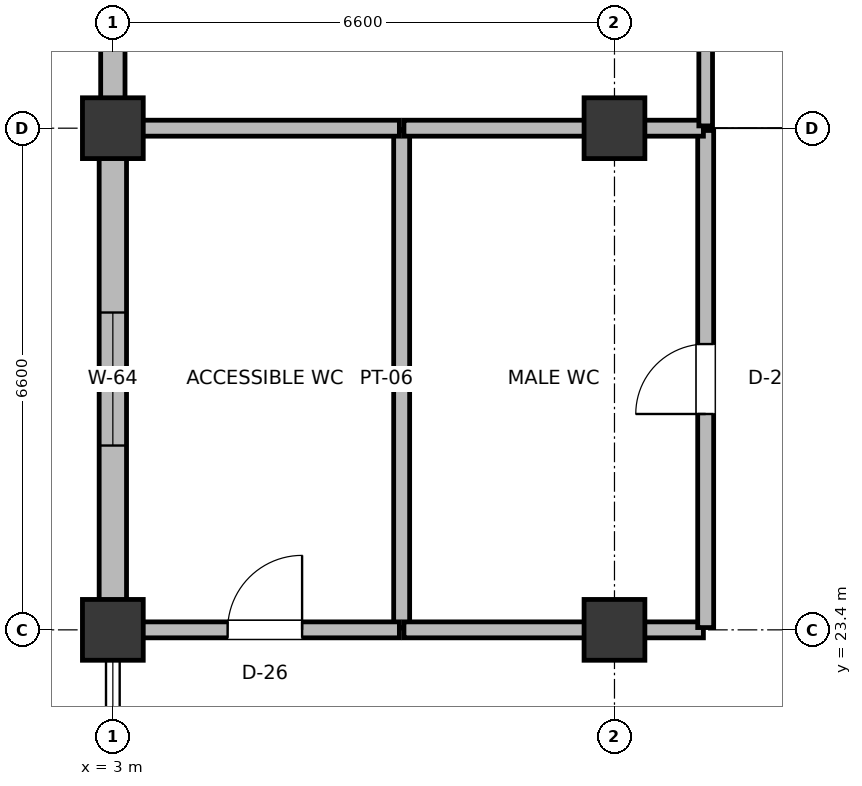
"""IFC4 building model, lengths in metres.
Left out: names, types, materials, properties, quantities, classifications, styles, units other than length and angle.
Written with IfcOpenShell. Run it as: python <this file> out.ifc"""

import sys

from ifc_helpers import new_model, si_unit, direction, frame, frame_2d, origin, origin_2d, place, context, subcontext, project, spatial, rectangle, extrude, element, fill, save


model = new_model("IFC4")
c1 = context("Model", 3, precision=1e-05, world=origin(), true_north=direction((0.0, 1.0)))
c2 = subcontext(c1, "Body", "Model", "MODEL_VIEW")
j1 = project(units=[si_unit("LENGTHUNIT", "METRE"), si_unit("PLANEANGLEUNIT", "RADIAN")], contexts=[c1])
p1 = place(None, origin())
s1 = spatial("IfcSite", under=j1, at=p1, CompositionType="ELEMENT")
p2 = place(p1, origin())
s2 = spatial("IfcBuilding", under=s1, at=p2, CompositionType="ELEMENT")
p3 = place(p2, frame((0.0, 0.0, 19.5)))
s3 = spatial("IfcBuildingStorey", under=s2, at=p3, CompositionType="ELEMENT", Elevation=19.5)
for number, where, z_axis, x_axis in (
    (1, (3.0, 23.4, 0.0), (0.0, 0.0, 1.0), (1.0, 0.0, 0.0)),
    (2, (3.0, 30.0, 0.0), (0.0, 0.0, 1.0), (1.0, 0.0, 0.0)),
    (3, (9.6, 23.4, 0.0), (0.0, 0.0, 1.0), (1.0, 0.0, 0.0)),
    (4, (9.6, 30.0, 0.0), (0.0, 0.0, 1.0), (1.0, 0.0, 0.0)),
):
    element("IfcColumn", number, at=place(p3, frame(where, z_axis=z_axis, x_axis=x_axis)), inside=s3, PredefinedType="COLUMN", context=c2, shape_type="SweptSolid", body=[
        extrude(rectangle(XDim=0.8, YDim=0.8, at=origin_2d()), origin(), (0.0, 0.0, 1.0), 4.5),
    ])
p4 = place(p3, frame((3.0, 23.785, 0.0), z_axis=(0.0, 0.0, 1.0), x_axis=(0.0, 1.0, 0.0)))
e5 = element("IfcWall", 5, at=p4, inside=s3, PredefinedType="SOLIDWALL", context=c2, shape_type="SweptSolid", body=[
    extrude(rectangle(XDim=5.83, YDim=0.36, at=frame_2d((2.915, 0.0))), origin(), (0.0, 0.0, 1.0), 3.575),
])
p5 = place(p4, frame((2.04, 0.0, 0.9)))
e6 = element("IfcOpeningElement", 6, at=p5, cuts=e5, PredefinedType="OPENING", context=c2, shape_type="SweptSolid", body=[
    extrude(rectangle(XDim=1.75, YDim=1.75, at=frame_2d((0.875, 0.875))), frame((0.0, 0.19, 0.0), z_axis=(0.0, -1.0, 0.0), x_axis=(1.0, 0.0, 0.0)), (0.0, 0.0, 1.0), 0.38),
])
p6 = place(p3, frame((3.0, 30.385, 0.0), z_axis=(0.0, 0.0, 1.0), x_axis=(0.0, 1.0, 0.0)))
e7 = element("IfcWall", 7, at=p6, inside=s3, PredefinedType="SOLIDWALL", context=c2, shape_type="SweptSolid", body=[
    extrude(rectangle(XDim=8.23, YDim=0.32, at=frame_2d((4.115, 0.0))), origin(), (0.0, 0.0, 1.0), 3.475),
])
p7 = place(p6, frame((2.99, 0.0, 0.9)))
e8 = element("IfcOpeningElement", 8, at=p7, cuts=e7, PredefinedType="OPENING", context=c2, shape_type="SweptSolid", body=[
    extrude(rectangle(XDim=2.25, YDim=1.85, at=frame_2d((1.125, 0.925))), frame((0.0, 0.17, 0.0), z_axis=(0.0, -1.0, 0.0), x_axis=(1.0, 0.0, 0.0)), (0.0, 0.0, 1.0), 0.34),
])
p8 = place(p3, frame((6.8, 23.43, 0.0), z_axis=(0.0, 0.0, 1.0), x_axis=(0.0, 1.0, 0.0)))
e9 = element("IfcWall", 9, at=p8, inside=s3, PredefinedType="PLUMBINGWALL", context=c2, shape_type="SweptSolid", body=[
    extrude(rectangle(XDim=6.54, YDim=0.21, at=frame_2d((3.27, 0.0))), origin(), (0.0, 0.0, 1.0), 3.155),
])
p9 = place(p3, frame((3.23, 23.4, 0.0), z_axis=(0.0, 0.0, 1.0), x_axis=(1.0, 0.0, 0.0)))
e10 = element("IfcWall", 10, at=p9, inside=s3, PredefinedType="PLUMBINGWALL", context=c2, shape_type="SweptSolid", body=[
    extrude(rectangle(XDim=3.54, YDim=0.21, at=frame_2d((1.77, 0.0))), origin(), (0.0, 0.0, 1.0), 3.315),
])
p10 = place(p9, frame((1.28, 0.0, 0.0)))
e11 = element("IfcOpeningElement", 11, at=p10, cuts=e10, PredefinedType="OPENING", context=c2, shape_type="SweptSolid", body=[
    extrude(rectangle(XDim=0.98, YDim=2.1, at=frame_2d((0.49, 1.05))), frame((0.0, 0.115, 0.0), z_axis=(0.0, -1.0, 0.0), x_axis=(1.0, 0.0, 0.0)), (0.0, 0.0, 1.0), 0.23),
])
p11 = place(p3, frame((3.23, 30.0, 0.0), z_axis=(0.0, 0.0, 1.0), x_axis=(1.0, 0.0, 0.0)))
e12 = element("IfcWall", 12, at=p11, inside=s3, PredefinedType="PLUMBINGWALL", context=c2, shape_type="SweptSolid", body=[
    extrude(rectangle(XDim=3.54, YDim=0.21, at=frame_2d((1.77, 0.0))), origin(), (0.0, 0.0, 1.0), 3.155),
])
p12 = place(p3, frame((6.83, 23.4, 0.0), z_axis=(0.0, 0.0, 1.0), x_axis=(1.0, 0.0, 0.0)))
e13 = element("IfcWall", 13, at=p12, inside=s3, PredefinedType="PLUMBINGWALL", context=c2, shape_type="SweptSolid", body=[
    extrude(rectangle(XDim=3.94, YDim=0.21, at=frame_2d((1.97, 0.0))), origin(), (0.0, 0.0, 1.0), 3.315),
])
p13 = place(p3, frame((10.8, 23.43, 0.0), z_axis=(0.0, 0.0, 1.0), x_axis=(0.0, 1.0, 0.0)))
e14 = element("IfcWall", 14, at=p13, inside=s3, PredefinedType="PLUMBINGWALL", context=c2, shape_type="SweptSolid", body=[
    extrude(rectangle(XDim=6.54, YDim=0.21, at=frame_2d((3.27, 0.0))), origin(), (0.0, 0.0, 1.0), 3.425),
])
p14 = place(p13, frame((2.81, 0.0, 0.0)))
e15 = element("IfcOpeningElement", 15, at=p14, cuts=e14, PredefinedType="OPENING", context=c2, shape_type="SweptSolid", body=[
    extrude(rectangle(XDim=0.92, YDim=2.1, at=frame_2d((0.46, 1.05))), frame((0.0, 0.115, 0.0), z_axis=(0.0, -1.0, 0.0), x_axis=(1.0, 0.0, 0.0)), (0.0, 0.0, 1.0), 0.23),
])
p15 = place(p3, frame((6.83, 30.0, 0.0), z_axis=(0.0, 0.0, 1.0), x_axis=(1.0, 0.0, 0.0)))
e16 = element("IfcWall", 16, at=p15, inside=s3, PredefinedType="PLUMBINGWALL", context=c2, shape_type="SweptSolid", body=[
    extrude(rectangle(XDim=3.94, YDim=0.21, at=frame_2d((1.97, 0.0))), origin(), (0.0, 0.0, 1.0), 3.155),
])
p16 = place(p3, frame((10.8, 30.03, 0.0), z_axis=(0.0, 0.0, 1.0), x_axis=(0.0, 1.0, 0.0)))
e17 = element("IfcWall", 17, at=p16, inside=s3, PredefinedType="PARTITIONING", context=c2, shape_type="SweptSolid", body=[
    extrude(rectangle(XDim=26.34, YDim=0.18, at=frame_2d((13.17, 0.0))), origin(), (0.0, 0.0, 1.0), 3.295),
])
p17 = place(p16, frame((12.645, 0.0, 0.0)))
e18 = element("IfcOpeningElement", 18, at=p17, cuts=e17, PredefinedType="OPENING", context=c2, shape_type="SweptSolid", body=[
    extrude(rectangle(XDim=1.05, YDim=2.2, at=frame_2d((0.525, 1.1))), frame((0.0, 0.1, 0.0), z_axis=(0.0, -1.0, 0.0), x_axis=(1.0, 0.0, 0.0)), (0.0, 0.0, 1.0), 0.2),
])
p18 = place(p5, origin())
e19 = element("IfcWindow", 19, at=p18, inside=s3, PartitioningType="DOUBLE_PANEL_VERTICAL", PredefinedType="WINDOW", context=c2, shape_type="SweptSolid", body=[
    extrude(rectangle(XDim=1.75, YDim=1.75, at=frame_2d((0.875, 0.875))), frame((0.0, 0.03, 0.0), z_axis=(0.0, -1.0, 0.0), x_axis=(1.0, 0.0, 0.0)), (0.0, 0.0, 1.0), 0.06),
])
fill(e6, e19)
p19 = place(p10, origin())
e20 = element("IfcDoor", 20, at=p19, inside=s3, OperationType="SINGLE_SWING_RIGHT", PredefinedType="DOOR", context=c2, shape_type="SweptSolid", body=[
    extrude(rectangle(XDim=0.98, YDim=2.1, at=frame_2d((0.49, 1.05))), frame((0.0, 0.025, 0.0), z_axis=(0.0, -1.0, 0.0), x_axis=(1.0, 0.0, 0.0)), (0.0, 0.0, 1.0), 0.05),
])
fill(e11, e20)
p20 = place(p14, origin())
e21 = element("IfcDoor", 21, at=p20, inside=s3, OperationType="SINGLE_SWING_LEFT", PredefinedType="DOOR", context=c2, shape_type="SweptSolid", body=[
    extrude(rectangle(XDim=0.92, YDim=2.1, at=frame_2d((0.46, 1.05))), frame((0.0, 0.025, 0.0), z_axis=(0.0, -1.0, 0.0), x_axis=(1.0, 0.0, 0.0)), (0.0, 0.0, 1.0), 0.05),
])
fill(e15, e21)
save(model, sys.argv[1])
